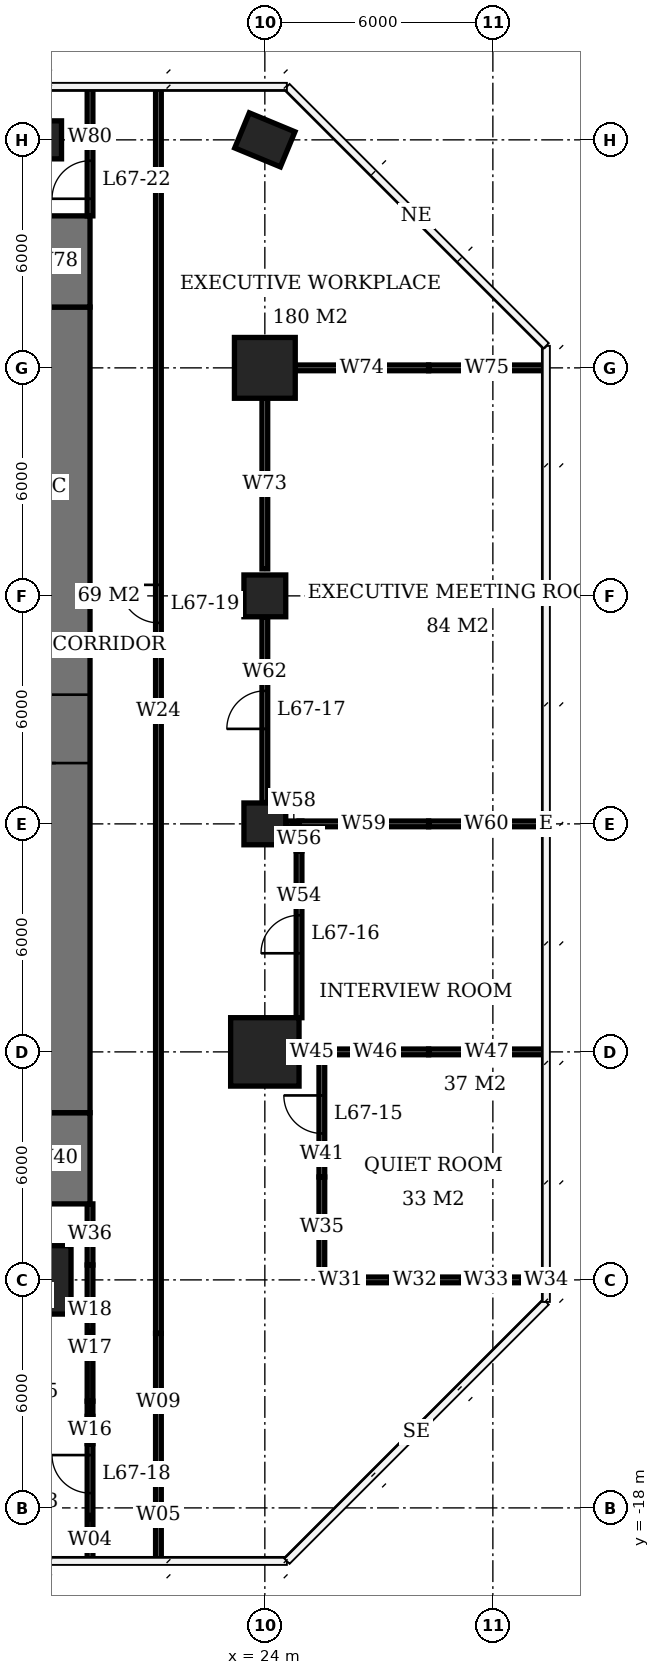
"""IFC4 building model, lengths in metres.
Left out: names, types, materials, properties, quantities, classifications, styles, units other than length and angle.
Written with IfcOpenShell. Run it as: python <this file> out.ifc"""

import sys

from ifc_helpers import new_model, si_unit, direction, frame, frame_2d, origin, origin_2d, place, context, subcontext, project, spatial, rectangle, extrude, element, fill, save


model = new_model("IFC4")
c1 = context("Model", 3, precision=1e-05, world=origin(), true_north=direction((0.0, 1.0)))
c2 = subcontext(c1, "Body", "Model", "MODEL_VIEW")
j1 = project(units=[si_unit("LENGTHUNIT", "METRE"), si_unit("PLANEANGLEUNIT", "RADIAN")], contexts=[c1])
p1 = place(None, origin())
s1 = spatial("IfcSite", under=j1, at=p1, CompositionType="ELEMENT")
p2 = place(p1, origin())
s2 = spatial("IfcBuilding", under=s1, at=p2, CompositionType="ELEMENT")
p3 = place(p2, frame((0.0, 0.0, 272.3)))
s3 = spatial("IfcBuildingStorey", under=s2, at=p3, CompositionType="ELEMENT", Elevation=272.3)
p4 = place(p3, frame((18.0, -12.0, 0.0), z_axis=(0.0, 0.0, 1.0), x_axis=(1.0, 0.0, 0.0)))
e1 = element("IfcColumn", 1, at=p4, inside=s3, PredefinedType="COLUMN", context=c2, shape_type="SweptSolid", body=[
    extrude(rectangle(XDim=1.8, YDim=1.8, at=origin_2d()), origin(), (0.0, 0.0, 1.0), 3.9),
])
p5 = place(p3, frame((18.0, 18.0, 0.0), z_axis=(0.0, 0.0, 1.0), x_axis=(1.0, 0.0, 0.0)))
e2 = element("IfcColumn", 2, at=p5, inside=s3, PredefinedType="COLUMN", context=c2, shape_type="SweptSolid", body=[
    extrude(rectangle(XDim=1.3, YDim=1.0, at=origin_2d()), origin(), (0.0, 0.0, 1.0), 3.9),
])
p6 = place(p3, frame((24.0, -6.0, 0.0), z_axis=(0.0, 0.0, 1.0), x_axis=(1.0, 0.0, 0.0)))
e3 = element("IfcColumn", 3, at=p6, inside=s3, PredefinedType="COLUMN", context=c2, shape_type="SweptSolid", body=[
    extrude(rectangle(XDim=1.8, YDim=1.8, at=origin_2d()), origin(), (0.0, 0.0, 1.0), 3.9),
])
for number, where, z_axis, x_axis in (
    (4, (24.0, 0.0, 0.0), (0.0, 0.0, 1.0), (1.0, 0.0, 0.0)),
    (5, (24.0, 6.0, 0.0), (0.0, 0.0, 1.0), (1.0, 0.0, 0.0)),
):
    element("IfcColumn", number, at=place(p3, frame(where, z_axis=z_axis, x_axis=x_axis)), inside=s3, PredefinedType="COLUMN", context=c2, shape_type="SweptSolid", body=[
        extrude(rectangle(XDim=1.1, YDim=1.1, at=origin_2d()), origin(), (0.0, 0.0, 1.0), 3.9),
    ])
p7 = place(p3, frame((24.0, 12.0, 0.0), z_axis=(0.0, 0.0, 1.0), x_axis=(1.0, 0.0, 0.0)))
e6 = element("IfcColumn", 6, at=p7, inside=s3, PredefinedType="COLUMN", context=c2, shape_type="SweptSolid", body=[
    extrude(rectangle(XDim=1.6, YDim=1.6, at=origin_2d()), origin(), (0.0, 0.0, 1.0), 3.9),
])
p8 = place(p3, frame((24.0, 18.0, 0.0), z_axis=(0.0, 0.0, 1.0), x_axis=(0.923879532511, -0.382683432365, 0.0)))
e7 = element("IfcColumn", 7, at=p8, inside=s3, PredefinedType="COLUMN", context=c2, shape_type="SweptSolid", body=[
    extrude(rectangle(XDim=1.3, YDim=1.0, at=origin_2d()), origin(), (0.0, 0.0, 1.0), 3.9),
])
p9 = place(p3, frame((18.5, -7.6, 0.0), z_axis=(0.0, 0.0, 1.0), x_axis=(0.0, 1.0, 0.0)))
e8 = element("IfcWall", 8, at=p9, inside=s3, PredefinedType="SHEAR", context=c2, shape_type="SweptSolid", body=[
    extrude(rectangle(XDim=21.2, YDim=1.8, at=frame_2d((10.6, 0.0))), origin(), (0.0, 0.0, 1.0), 3.9),
])
p10 = place(p9, frame((9.2, 0.0, 0.0)))
e9 = element("IfcOpeningElement", 9, at=p10, cuts=e8, PredefinedType="OPENING", context=c2, shape_type="SweptSolid", body=[
    extrude(rectangle(XDim=1.8, YDim=2.4, at=frame_2d((0.9, 1.2))), frame((0.0, 0.91, 0.0), z_axis=(0.0, -1.0, 0.0), x_axis=(1.0, 0.0, 0.0)), (0.0, 0.0, 1.0), 1.82),
])
for number, where, z_axis, x_axis in (
    (10, (18.5, -10.0, 0.0), (0.0, 0.0, 1.0), (0.0, 1.0, 0.0)),
    (11, (18.5, 13.6, 0.0), (0.0, 0.0, 1.0), (0.0, 1.0, 0.0)),
):
    element("IfcWall", number, at=place(p3, frame(where, z_axis=z_axis, x_axis=x_axis)), inside=s3, PredefinedType="SHEAR", context=c2, shape_type="SweptSolid", body=[
        extrude(rectangle(XDim=2.4, YDim=1.8, at=frame_2d((1.2, 0.0))), origin(), (0.0, 0.0, 1.0), 3.9),
    ])
p11 = place(p3, frame((25.5, -12.0, 0.0), z_axis=(0.0, 0.0, 1.0), x_axis=(1.0, 0.0, 0.0)))
e12 = element("IfcWall", 12, at=p11, inside=s3, PredefinedType="PARTITIONING", context=c2, shape_type="SweptSolid", body=[
    extrude(rectangle(XDim=0.99, YDim=0.15, at=frame_2d((0.495, 0.0))), origin(), (0.0, 0.0, 1.0), 2.65),
])
p12 = place(p3, frame((26.49, -12.0, 0.0), z_axis=(0.0, 0.0, 1.0), x_axis=(1.0, 0.0, 0.0)))
e13 = element("IfcWall", 13, at=p12, inside=s3, PredefinedType="PARTITIONING", context=c2, shape_type="SweptSolid", body=[
    extrude(rectangle(XDim=1.718, YDim=0.15, at=frame_2d((0.859, 0.0))), origin(), (0.0, 0.0, 1.0), 3.65),
])
p13 = place(p3, frame((28.208, -12.0, 0.0), z_axis=(0.0, 0.0, 1.0), x_axis=(1.0, 0.0, 0.0)))
e14 = element("IfcWall", 14, at=p13, inside=s3, PredefinedType="PARTITIONING", context=c2, shape_type="SweptSolid", body=[
    extrude(rectangle(XDim=2.029, YDim=0.15, at=frame_2d((1.015, 0.0))), origin(), (0.0, 0.0, 1.0), 2.65),
])
p14 = place(p3, frame((30.237, -12.0, 0.0), z_axis=(0.0, 0.0, 1.0), x_axis=(1.0, 0.0, 0.0)))
e15 = element("IfcWall", 15, at=p14, inside=s3, PredefinedType="PARTITIONING", context=c2, shape_type="SweptSolid", body=[
    extrude(rectangle(XDim=1.138, YDim=0.15, at=frame_2d((0.569, 0.0))), origin(), (0.0, 0.0, 1.0), 3.65),
])
p15 = place(p3, frame((24.9, -6.0, 0.0), z_axis=(0.0, 0.0, 1.0), x_axis=(1.0, 0.0, 0.0)))
e16 = element("IfcWall", 16, at=p15, inside=s3, PredefinedType="PARTITIONING", context=c2, shape_type="SweptSolid", body=[
    extrude(rectangle(XDim=0.675, YDim=0.15, at=frame_2d((0.337, 0.0))), origin(), (0.0, 0.0, 1.0), 2.65),
])
p16 = place(p3, frame((25.5, -6.0, 0.0), z_axis=(0.0, 0.0, 1.0), x_axis=(1.0, 0.0, 0.0)))
e17 = element("IfcWall", 17, at=p16, inside=s3, PredefinedType="PARTITIONING", context=c2, shape_type="SweptSolid", body=[
    extrude(rectangle(XDim=2.81, YDim=0.15, at=frame_2d((1.405, 0.0))), origin(), (0.0, 0.0, 1.0), 2.65),
])
p17 = place(p3, frame((28.31, -6.0, 0.0), z_axis=(0.0, 0.0, 1.0), x_axis=(1.0, 0.0, 0.0)))
e18 = element("IfcWall", 18, at=p17, inside=s3, PredefinedType="PARTITIONING", context=c2, shape_type="SweptSolid", body=[
    extrude(rectangle(XDim=3.065, YDim=0.15, at=frame_2d((1.532, 0.0))), origin(), (0.0, 0.0, 1.0), 3.65),
])
p18 = place(p3, frame((24.55, 0.0, 0.0), z_axis=(0.0, 0.0, 1.0), x_axis=(1.0, 0.0, 0.0)))
e19 = element("IfcWall", 19, at=p18, inside=s3, PredefinedType="PARTITIONING", context=c2, shape_type="SweptSolid", body=[
    extrude(rectangle(XDim=0.425, YDim=0.15, at=frame_2d((0.212, 0.0))), origin(), (0.0, 0.0, 1.0), 2.65),
])
p19 = place(p3, frame((24.9, 0.0, 0.0), z_axis=(0.0, 0.0, 1.0), x_axis=(1.0, 0.0, 0.0)))
e20 = element("IfcWall", 20, at=p19, inside=s3, PredefinedType="PARTITIONING", context=c2, shape_type="SweptSolid", body=[
    extrude(rectangle(XDim=3.41, YDim=0.15, at=frame_2d((1.705, 0.0))), origin(), (0.0, 0.0, 1.0), 2.65),
])
p20 = place(p3, frame((28.31, 0.0, 0.0), z_axis=(0.0, 0.0, 1.0), x_axis=(1.0, 0.0, 0.0)))
e21 = element("IfcWall", 21, at=p20, inside=s3, PredefinedType="PARTITIONING", context=c2, shape_type="SweptSolid", body=[
    extrude(rectangle(XDim=3.04, YDim=0.15, at=frame_2d((1.52, 0.0))), origin(), (0.0, 0.0, 1.0), 3.65),
])
p21 = place(p3, frame((24.8, 12.0, 0.0), z_axis=(0.0, 0.0, 1.0), x_axis=(1.0, 0.0, 0.0)))
e22 = element("IfcWall", 22, at=p21, inside=s3, PredefinedType="PARTITIONING", context=c2, shape_type="SweptSolid", body=[
    extrude(rectangle(XDim=3.51, YDim=0.15, at=frame_2d((1.755, 0.0))), origin(), (0.0, 0.0, 1.0), 2.65),
])
p22 = place(p3, frame((28.31, 12.0, 0.0), z_axis=(0.0, 0.0, 1.0), x_axis=(1.0, 0.0, 0.0)))
e23 = element("IfcWall", 23, at=p22, inside=s3, PredefinedType="PARTITIONING", context=c2, shape_type="SweptSolid", body=[
    extrude(rectangle(XDim=3.065, YDim=0.15, at=frame_2d((1.532, 0.0))), origin(), (0.0, 0.0, 1.0), 3.65),
])
p23 = place(p3, frame((24.0, 0.56, 0.0), z_axis=(0.0, 0.0, 1.0), x_axis=(0.0, 1.0, 0.0)))
e24 = element("IfcWall", 24, at=p23, inside=s3, PredefinedType="PARTITIONING", context=c2, shape_type="SweptSolid", body=[
    extrude(rectangle(XDim=4.88, YDim=0.15, at=frame_2d((2.44, 0.0))), origin(), (0.0, 0.0, 1.0), 3.65),
])
p24 = place(p23, frame((1.94, 0.0, 0.0)))
e25 = element("IfcOpeningElement", 25, at=p24, cuts=e24, PredefinedType="OPENING", context=c2, shape_type="SweptSolid", body=[
    extrude(rectangle(XDim=1.0, YDim=2.4, at=frame_2d((0.5, 1.2))), frame((0.0, 0.085, 0.0), z_axis=(0.0, -1.0, 0.0), x_axis=(1.0, 0.0, 0.0)), (0.0, 0.0, 1.0), 0.17),
])
p25 = place(p3, frame((24.0, 6.71, 0.0), z_axis=(0.0, 0.0, 1.0), x_axis=(0.0, 1.0, 0.0)))
e26 = element("IfcWall", 26, at=p25, inside=s3, PredefinedType="PARTITIONING", context=c2, shape_type="SweptSolid", body=[
    extrude(rectangle(XDim=4.49, YDim=0.15, at=frame_2d((2.245, 0.0))), origin(), (0.0, 0.0, 1.0), 3.65),
])
p26 = place(p3, frame((24.9, -5.1, 0.0), z_axis=(0.0, 0.0, 1.0), x_axis=(0.0, 1.0, 0.0)))
e27 = element("IfcWall", 27, at=p26, inside=s3, PredefinedType="PARTITIONING", context=c2, shape_type="SweptSolid", body=[
    extrude(rectangle(XDim=4.39, YDim=0.15, at=frame_2d((2.195, 0.0))), origin(), (0.0, 0.0, 1.0), 3.65),
])
p27 = place(p26, frame((1.695, 0.0, 0.0)))
e28 = element("IfcOpeningElement", 28, at=p27, cuts=e27, PredefinedType="OPENING", context=c2, shape_type="SweptSolid", body=[
    extrude(rectangle(XDim=1.0, YDim=2.4, at=frame_2d((0.5, 1.2))), frame((0.0, 0.085, 0.0), z_axis=(0.0, -1.0, 0.0), x_axis=(1.0, 0.0, 0.0)), (0.0, 0.0, 1.0), 0.17),
])
p28 = place(p3, frame((24.9, -0.71, 0.0), z_axis=(0.0, 0.0, 1.0), x_axis=(0.0, 1.0, 0.0)))
e29 = element("IfcWall", 29, at=p28, inside=s3, PredefinedType="PARTITIONING", context=c2, shape_type="SweptSolid", body=[
    extrude(rectangle(XDim=0.635, YDim=0.15, at=frame_2d((0.317, 0.0))), origin(), (0.0, 0.0, 1.0), 2.65),
])
p29 = place(p3, frame((25.5, -11.935, 0.0), z_axis=(0.0, 0.0, 1.0), x_axis=(0.0, 1.0, 0.0)))
e30 = element("IfcWall", 30, at=p29, inside=s3, PredefinedType="PARTITIONING", context=c2, shape_type="SweptSolid", body=[
    extrude(rectangle(XDim=2.643, YDim=0.15, at=frame_2d((1.322, 0.0))), origin(), (0.0, 0.0, 1.0), 3.65),
])
p30 = place(p3, frame((25.5, -9.292, 0.0), z_axis=(0.0, 0.0, 1.0), x_axis=(0.0, 1.0, 0.0)))
e31 = element("IfcWall", 31, at=p30, inside=s3, PredefinedType="PARTITIONING", context=c2, shape_type="SweptSolid", body=[
    extrude(rectangle(XDim=3.217, YDim=0.15, at=frame_2d((1.608, 0.0))), origin(), (0.0, 0.0, 1.0), 2.65),
])
p31 = place(p30, frame((1.146, 0.0, 0.0)))
e32 = element("IfcOpeningElement", 32, at=p31, cuts=e31, PredefinedType="OPENING", context=c2, shape_type="SweptSolid", body=[
    extrude(rectangle(XDim=1.0, YDim=2.4, at=frame_2d((0.5, 1.2))), frame((0.0, 0.085, 0.0), z_axis=(0.0, -1.0, 0.0), x_axis=(1.0, 0.0, 0.0)), (0.0, 0.0, 1.0), 0.17),
])
p32 = place(p3, frame((19.4, -19.375, 0.0), z_axis=(0.0, 0.0, 1.0), x_axis=(0.0, 1.0, 0.0)))
e33 = element("IfcWall", 33, at=p32, inside=s3, PredefinedType="PARTITIONING", context=c2, shape_type="SweptSolid", body=[
    extrude(rectangle(XDim=3.065, YDim=0.15, at=frame_2d((1.532, 0.0))), origin(), (0.0, 0.0, 1.0), 3.65),
])
p33 = place(p32, frame((1.765, 0.0, 0.0)))
e34 = element("IfcOpeningElement", 34, at=p33, cuts=e33, PredefinedType="OPENING", context=c2, shape_type="SweptSolid", body=[
    extrude(rectangle(XDim=1.0, YDim=2.4, at=frame_2d((0.5, 1.2))), frame((0.0, 0.085, 0.0), z_axis=(0.0, -1.0, 0.0), x_axis=(1.0, 0.0, 0.0)), (0.0, 0.0, 1.0), 0.17),
])
p34 = place(p3, frame((19.4, -16.31, 0.0), z_axis=(0.0, 0.0, 1.0), x_axis=(0.0, 1.0, 0.0)))
e35 = element("IfcWall", 35, at=p34, inside=s3, PredefinedType="PARTITIONING", context=c2, shape_type="SweptSolid", body=[
    extrude(rectangle(XDim=0.72, YDim=0.15, at=frame_2d((0.36, 0.0))), origin(), (0.0, 0.0, 1.0), 2.65),
])
p35 = place(p3, frame((19.4, -15.59, 0.0), z_axis=(0.0, 0.0, 1.0), x_axis=(0.0, 1.0, 0.0)))
e36 = element("IfcWall", 36, at=p35, inside=s3, PredefinedType="PARTITIONING", context=c2, shape_type="SweptSolid", body=[
    extrude(rectangle(XDim=0.398, YDim=0.15, at=frame_2d((0.199, 0.0))), origin(), (0.0, 0.0, 1.0), 3.65),
])
p36 = place(p3, frame((19.4, -15.192, 0.0), z_axis=(0.0, 0.0, 1.0), x_axis=(0.0, 1.0, 0.0)))
e37 = element("IfcWall", 37, at=p36, inside=s3, PredefinedType="PARTITIONING", context=c2, shape_type="SweptSolid", body=[
    extrude(rectangle(XDim=3.584, YDim=0.15, at=frame_2d((1.792, 0.0))), origin(), (0.0, 0.0, 1.0), 2.65),
])
p37 = place(p3, frame((19.4, -11.608, 0.0), z_axis=(0.0, 0.0, 1.0), x_axis=(0.0, 1.0, 0.0)))
e38 = element("IfcWall", 38, at=p37, inside=s3, PredefinedType="PARTITIONING", context=c2, shape_type="SweptSolid", body=[
    extrude(rectangle(XDim=1.608, YDim=0.15, at=frame_2d((0.804, 0.0))), origin(), (0.0, 0.0, 1.0), 3.65),
])
p38 = place(p3, frame((19.4, 16.0, 0.0), z_axis=(0.0, 0.0, 1.0), x_axis=(0.0, 1.0, 0.0)))
e39 = element("IfcWall", 39, at=p38, inside=s3, PredefinedType="PARTITIONING", context=c2, shape_type="SweptSolid", body=[
    extrude(rectangle(XDim=3.375, YDim=0.15, at=frame_2d((1.688, 0.0))), origin(), (0.0, 0.0, 1.0), 3.65),
])
p39 = place(p38, frame((0.45, 0.0, 0.0)))
e40 = element("IfcOpeningElement", 40, at=p39, cuts=e39, PredefinedType="OPENING", context=c2, shape_type="SweptSolid", body=[
    extrude(rectangle(XDim=1.0, YDim=2.1, at=frame_2d((0.5, 1.05))), frame((0.0, 0.085, 0.0), z_axis=(0.0, -1.0, 0.0), x_axis=(1.0, 0.0, 0.0)), (0.0, 0.0, 1.0), 0.17),
])
p40 = place(p3, frame((21.2, -19.375, 0.0), z_axis=(0.0, 0.0, 1.0), x_axis=(0.0, 1.0, 0.0)))
e41 = element("IfcWall", 41, at=p40, inside=s3, PredefinedType="PARTITIONING", context=c2, shape_type="SweptSolid", body=[
    extrude(rectangle(XDim=2.383, YDim=0.15, at=frame_2d((1.191, 0.0))), origin(), (0.0, 0.0, 1.0), 3.65),
])
p41 = place(p3, frame((21.2, -16.992, 0.0), z_axis=(0.0, 0.0, 1.0), x_axis=(0.0, 1.0, 0.0)))
e42 = element("IfcWall", 42, at=p41, inside=s3, PredefinedType="PARTITIONING", context=c2, shape_type="SweptSolid", body=[
    extrude(rectangle(XDim=3.584, YDim=0.15, at=frame_2d((1.792, 0.0))), origin(), (0.0, 0.0, 1.0), 2.65),
])
p42 = place(p3, frame((21.2, -13.408, 0.0), z_axis=(0.0, 0.0, 1.0), x_axis=(0.0, 1.0, 0.0)))
e43 = element("IfcWall", 43, at=p42, inside=s3, PredefinedType="PARTITIONING", context=c2, shape_type="SweptSolid", body=[
    extrude(rectangle(XDim=32.783, YDim=0.15, at=frame_2d((16.392, 0.0))), origin(), (0.0, 0.0, 1.0), 3.65),
])
p43 = place(p42, frame((18.698, 0.0, 0.0)))
e44 = element("IfcOpeningElement", 44, at=p43, cuts=e43, PredefinedType="OPENING", context=c2, shape_type="SweptSolid", body=[
    extrude(rectangle(XDim=1.0, YDim=2.4, at=frame_2d((0.5, 1.2))), frame((0.0, 0.085, 0.0), z_axis=(0.0, -1.0, 0.0), x_axis=(1.0, 0.0, 0.0)), (0.0, 0.0, 1.0), 0.17),
])
p44 = place(p10, origin())
e45 = element("IfcDoor", 45, at=p44, inside=s3, OperationType="DOUBLE_DOOR_SINGLE_SWING", PredefinedType="DOOR", context=c2, shape_type="SweptSolid", body=[
    extrude(rectangle(XDim=1.8, YDim=2.4, at=frame_2d((0.9, 1.2))), frame((0.0, 0.025, 0.0), z_axis=(0.0, -1.0, 0.0), x_axis=(1.0, 0.0, 0.0)), (0.0, 0.0, 1.0), 0.05),
])
fill(e9, e45)
p45 = place(p31, origin())
e46 = element("IfcDoor", 46, at=p45, inside=s3, OperationType="SINGLE_SWING_RIGHT", PredefinedType="DOOR", context=c2, shape_type="SweptSolid", body=[
    extrude(rectangle(XDim=1.0, YDim=2.4, at=frame_2d((0.5, 1.2))), frame((0.0, 0.025, 0.0), z_axis=(0.0, -1.0, 0.0), x_axis=(1.0, 0.0, 0.0)), (0.0, 0.0, 1.0), 0.05),
])
fill(e32, e46)
p46 = place(p27, origin())
e47 = element("IfcDoor", 47, at=p46, inside=s3, OperationType="SINGLE_SWING_LEFT", PredefinedType="DOOR", context=c2, shape_type="SweptSolid", body=[
    extrude(rectangle(XDim=1.0, YDim=2.4, at=frame_2d((0.5, 1.2))), frame((0.0, 0.025, 0.0), z_axis=(0.0, -1.0, 0.0), x_axis=(1.0, 0.0, 0.0)), (0.0, 0.0, 1.0), 0.05),
])
fill(e28, e47)
p47 = place(p24, origin())
e48 = element("IfcDoor", 48, at=p47, inside=s3, OperationType="SINGLE_SWING_LEFT", PredefinedType="DOOR", context=c2, shape_type="SweptSolid", body=[
    extrude(rectangle(XDim=1.0, YDim=2.4, at=frame_2d((0.5, 1.2))), frame((0.0, 0.025, 0.0), z_axis=(0.0, -1.0, 0.0), x_axis=(1.0, 0.0, 0.0)), (0.0, 0.0, 1.0), 0.05),
])
fill(e25, e48)
p48 = place(p33, origin())
e49 = element("IfcDoor", 49, at=p48, inside=s3, OperationType="SINGLE_SWING_RIGHT", PredefinedType="DOOR", context=c2, shape_type="SweptSolid", body=[
    extrude(rectangle(XDim=1.0, YDim=2.4, at=frame_2d((0.5, 1.2))), frame((0.0, 0.025, 0.0), z_axis=(0.0, -1.0, 0.0), x_axis=(1.0, 0.0, 0.0)), (0.0, 0.0, 1.0), 0.05),
])
fill(e34, e49)
p49 = place(p43, origin())
e50 = element("IfcDoor", 50, at=p49, inside=s3, OperationType="SINGLE_SWING_RIGHT", PredefinedType="DOOR", context=c2, shape_type="SweptSolid", body=[
    extrude(rectangle(XDim=1.0, YDim=2.4, at=frame_2d((0.5, 1.2))), frame((0.0, 0.025, 0.0), z_axis=(0.0, -1.0, 0.0), x_axis=(1.0, 0.0, 0.0)), (0.0, 0.0, 1.0), 0.05),
])
fill(e44, e50)
p50 = place(p39, origin())
e51 = element("IfcDoor", 51, at=p50, inside=s3, OperationType="SINGLE_SWING_LEFT", PredefinedType="DOOR", context=c2, shape_type="SweptSolid", body=[
    extrude(rectangle(XDim=1.0, YDim=2.1, at=frame_2d((0.5, 1.05))), frame((0.0, 0.025, 0.0), z_axis=(0.0, -1.0, 0.0), x_axis=(1.0, 0.0, 0.0)), (0.0, 0.0, 1.0), 0.05),
])
fill(e40, e51)
save(model, sys.argv[1])
